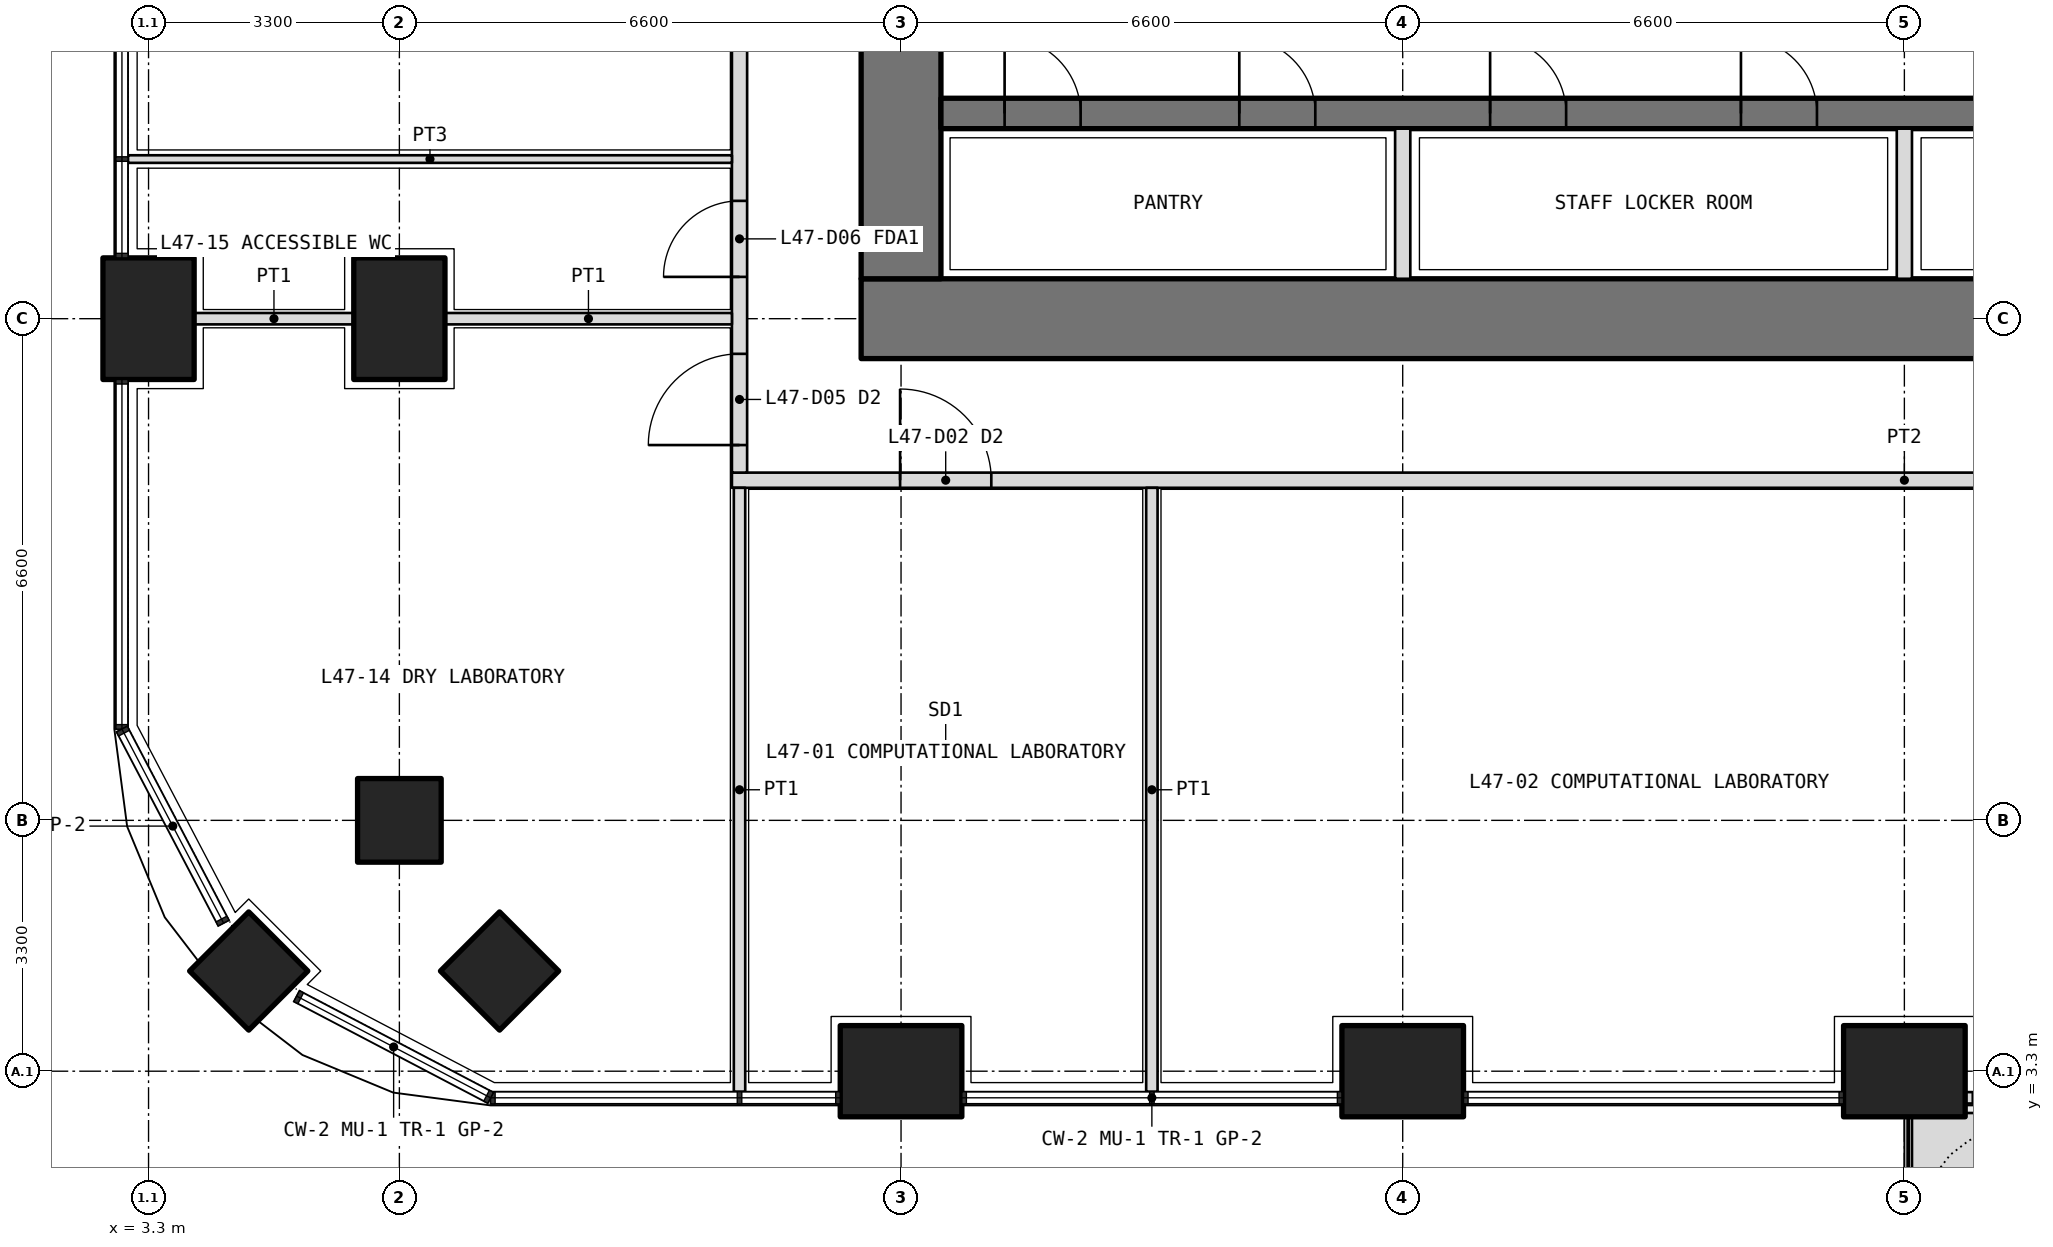
"""IFC4 building model, lengths in metres.
Left out: names, types, materials, properties, quantities, classifications, styles, units other than length and angle.
Written with IfcOpenShell. Run it as: python <this file> out.ifc"""

import sys

from ifc_helpers import new_model, si_unit, direction, frame, frame_2d, origin, origin_2d, place, context, subcontext, project, spatial, polyline, rectangle, outline, extrude, element, fill, save


model = new_model("IFC4")
c1 = context("Model", 3, precision=1e-05, world=origin(), true_north=direction((0.0, 1.0)))
c2 = subcontext(c1, "Body", "Model", "MODEL_VIEW")
j1 = project(units=[si_unit("LENGTHUNIT", "METRE"), si_unit("PLANEANGLEUNIT", "RADIAN")], contexts=[c1])
p1 = place(None, origin())
s1 = spatial("IfcSite", under=j1, at=p1, CompositionType="ELEMENT")
p2 = place(p1, origin())
s2 = spatial("IfcBuilding", under=s1, at=p2, CompositionType="ELEMENT")
p3 = place(p2, frame((0.0, 0.0, 206.1)))
s3 = spatial("IfcBuildingStorey", under=s2, at=p3, CompositionType="ELEMENT", Elevation=206.1)
p4 = place(p3, frame((4.618, 4.618, 0.0), z_axis=(0.0, 0.0, 1.0), x_axis=(0.707106781187, 0.707106781187, 0.0)))
e1 = element("IfcColumn", 1, at=p4, inside=s3, PredefinedType="COLUMN", context=c2, shape_type="SweptSolid", body=[
    extrude(rectangle(XDim=1.1, YDim=1.1, at=origin_2d()), origin(), (0.0, 0.0, 1.0), 4.2),
])
for number, where, z_axis, x_axis in (
    (2, (13.2, 3.3, 0.0), (0.0, 0.0, 1.0), (1.0, 0.0, 0.0)),
    (3, (19.8, 3.3, 0.0), (0.0, 0.0, 1.0), (1.0, 0.0, 0.0)),
    (4, (26.4, 3.3, 0.0), (0.0, 0.0, 1.0), (1.0, 0.0, 0.0)),
    (5, (3.3, 13.2, 0.0), (0.0, 0.0, 1.0), (0.0, 1.0, 0.0)),
):
    element("IfcColumn", number, at=place(p3, frame(where, z_axis=z_axis, x_axis=x_axis)), inside=s3, PredefinedType="COLUMN", context=c2, shape_type="SweptSolid", body=[
        extrude(rectangle(XDim=1.6, YDim=1.2, at=origin_2d()), origin(), (0.0, 0.0, 1.0), 4.2),
    ])
for number, where, z_axis, x_axis in (
    (6, (6.6, 6.6, 0.0), (0.0, 0.0, 1.0), (1.0, 0.0, 0.0)),
    (7, (7.918, 4.618, 0.0), (0.0, 0.0, 1.0), (0.707, 0.707, 0.0)),
):
    element("IfcColumn", number, at=place(p3, frame(where, z_axis=z_axis, x_axis=x_axis)), inside=s3, PredefinedType="COLUMN", context=c2, shape_type="SweptSolid", body=[
        extrude(rectangle(XDim=1.1, YDim=1.1, at=origin_2d()), origin(), (0.0, 0.0, 1.0), 4.2),
    ])
p5 = place(p3, frame((6.6, 13.2, 0.0), z_axis=(0.0, 0.0, 1.0), x_axis=(0.0, 1.0, 0.0)))
e8 = element("IfcColumn", 8, at=p5, inside=s3, PredefinedType="COLUMN", context=c2, shape_type="SweptSolid", body=[
    extrude(rectangle(XDim=1.6, YDim=1.2, at=origin_2d()), origin(), (0.0, 0.0, 1.0), 4.2),
])
p6 = place(p3, origin())
e9 = element("IfcWall", 9, at=p6, inside=s3, PredefinedType="USERDEFINED", context=c2, shape_type="SweptSolid", body=[
    extrude(outline(polyline([(26.5, 1.75), (28.95, 1.75), (28.95, 2.75), (26.5, 2.75), (26.5, 1.75)]), holes=[polyline([(26.65, 1.9), (28.8, 1.9), (28.8, 2.6), (26.65, 2.6), (26.65, 1.9)])]), origin(), (0.0, 0.0, 1.0), 1.05),
])
p7 = place(p3, frame((27.2, 2.95, 0.0), z_axis=(0.0, 0.0, 1.0), x_axis=(1.0, 0.0, 0.0)))
e10 = element("IfcWall", 10, at=p7, inside=s3, PredefinedType="SOLIDWALL", context=c2, shape_type="SweptSolid", body=[
    extrude(rectangle(XDim=5.0, YDim=0.15, at=frame_2d((2.5, 0.0))), origin(), (0.0, 0.0, 1.0), 2.7),
])
p8 = place(p7, frame((2.75, 0.0, 0.0)))
e11 = element("IfcOpeningElement", 11, at=p8, cuts=e10, PredefinedType="OPENING", context=c2, shape_type="SweptSolid", body=[
    extrude(rectangle(XDim=1.0, YDim=2.4, at=frame_2d((0.5, 1.2))), frame((0.0, 0.085, 0.0), z_axis=(0.0, -1.0, 0.0), x_axis=(1.0, 0.0, 0.0)), (0.0, 0.0, 1.0), 0.17),
])
p9 = place(p7, frame((0.1, 0.0, 0.1)))
e12 = element("IfcOpeningElement", 12, at=p9, cuts=e10, PredefinedType="OPENING", context=c2, shape_type="SweptSolid", body=[
    extrude(rectangle(XDim=2.15, YDim=2.3, at=frame_2d((1.075, 1.15))), frame((0.0, 0.085, 0.0), z_axis=(0.0, -1.0, 0.0), x_axis=(1.0, 0.0, 0.0)), (0.0, 0.0, 1.0), 0.17),
])
p10 = place(p7, frame((3.85, 0.0, 0.1)))
e13 = element("IfcOpeningElement", 13, at=p10, cuts=e10, PredefinedType="OPENING", context=c2, shape_type="SweptSolid", body=[
    extrude(rectangle(XDim=1.05, YDim=2.3, at=frame_2d((0.525, 1.15))), frame((0.0, 0.085, 0.0), z_axis=(0.0, -1.0, 0.0), x_axis=(1.0, 0.0, 0.0)), (0.0, 0.0, 1.0), 0.17),
])
p11 = place(p3, frame((12.675, 13.2, 0.0), z_axis=(0.0, 0.0, 1.0), x_axis=(1.0, 0.0, 0.0)))
e14 = element("IfcWall", 14, at=p11, inside=s3, PredefinedType="SHEAR", context=c2, shape_type="SweptSolid", body=[
    extrude(rectangle(XDim=27.45, YDim=1.05, at=frame_2d((13.725, 0.0))), origin(), (0.0, 0.0, 1.0), 4.2),
])
p12 = place(p3, frame((13.2, 32.475, 0.0), z_axis=(0.0, 0.0, 1.0), x_axis=(0.0, -1.0, 0.0)))
e15 = element("IfcWall", 15, at=p12, inside=s3, PredefinedType="SHEAR", context=c2, shape_type="SweptSolid", body=[
    extrude(rectangle(XDim=18.75, YDim=1.05, at=frame_2d((9.375, 0.0))), origin(), (0.0, 0.0, 1.0), 4.2),
])
p13 = place(p12, frame((14.125, 0.0, 0.0)))
e16 = element("IfcOpeningElement", 16, at=p13, cuts=e15, PredefinedType="OPENING", context=c2, shape_type="SweptSolid", body=[
    extrude(rectangle(XDim=1.6, YDim=2.1, at=frame_2d((0.8, 1.05))), frame((0.0, 0.535, 0.0), z_axis=(0.0, -1.0, 0.0), x_axis=(1.0, 0.0, 0.0)), (0.0, 0.0, 1.0), 1.07),
])
p14 = place(p12, frame((3.325, 0.0, 0.0)))
e17 = element("IfcOpeningElement", 17, at=p14, cuts=e15, PredefinedType="OPENING", context=c2, shape_type="SweptSolid", body=[
    extrude(rectangle(XDim=1.6, YDim=2.1, at=frame_2d((0.8, 1.05))), frame((0.0, 0.535, 0.0), z_axis=(0.0, -1.0, 0.0), x_axis=(1.0, 0.0, 0.0)), (0.0, 0.0, 1.0), 1.07),
])
p15 = place(p3, frame((13.725, 15.9, 0.0), z_axis=(0.0, 0.0, 1.0), x_axis=(1.0, 0.0, 0.0)))
e18 = element("IfcWall", 18, at=p15, inside=s3, PredefinedType="SHEAR", context=c2, shape_type="SweptSolid", body=[
    extrude(rectangle(XDim=25.35, YDim=0.4, at=frame_2d((12.675, 0.0))), origin(), (0.0, 0.0, 1.0), 4.2),
])
p16 = place(p15, frame((0.837, 0.0, 0.0)))
e19 = element("IfcOpeningElement", 19, at=p16, cuts=e18, PredefinedType="OPENING", context=c2, shape_type="SweptSolid", body=[
    extrude(rectangle(XDim=1.0, YDim=2.1, at=frame_2d((0.5, 1.05))), frame((0.0, 0.21, 0.0), z_axis=(0.0, -1.0, 0.0), x_axis=(1.0, 0.0, 0.0)), (0.0, 0.0, 1.0), 0.42),
])
p17 = place(p15, frame((3.925, 0.0, 0.0)))
e20 = element("IfcOpeningElement", 20, at=p17, cuts=e18, PredefinedType="OPENING", context=c2, shape_type="SweptSolid", body=[
    extrude(rectangle(XDim=1.0, YDim=2.1, at=frame_2d((0.5, 1.05))), frame((0.0, 0.21, 0.0), z_axis=(0.0, -1.0, 0.0), x_axis=(1.0, 0.0, 0.0)), (0.0, 0.0, 1.0), 0.42),
])
p18 = place(p15, frame((7.225, 0.0, 0.0)))
e21 = element("IfcOpeningElement", 21, at=p18, cuts=e18, PredefinedType="OPENING", context=c2, shape_type="SweptSolid", body=[
    extrude(rectangle(XDim=1.0, YDim=2.1, at=frame_2d((0.5, 1.05))), frame((0.0, 0.21, 0.0), z_axis=(0.0, -1.0, 0.0), x_axis=(1.0, 0.0, 0.0)), (0.0, 0.0, 1.0), 0.42),
])
p19 = place(p15, frame((10.525, 0.0, 0.0)))
e22 = element("IfcOpeningElement", 22, at=p19, cuts=e18, PredefinedType="OPENING", context=c2, shape_type="SweptSolid", body=[
    extrude(rectangle(XDim=1.0, YDim=2.1, at=frame_2d((0.5, 1.05))), frame((0.0, 0.21, 0.0), z_axis=(0.0, -1.0, 0.0), x_axis=(1.0, 0.0, 0.0)), (0.0, 0.0, 1.0), 0.42),
])
p20 = place(p15, frame((13.825, 0.0, 0.0)))
e23 = element("IfcOpeningElement", 23, at=p20, cuts=e18, PredefinedType="OPENING", context=c2, shape_type="SweptSolid", body=[
    extrude(rectangle(XDim=1.0, YDim=2.1, at=frame_2d((0.5, 1.05))), frame((0.0, 0.21, 0.0), z_axis=(0.0, -1.0, 0.0), x_axis=(1.0, 0.0, 0.0)), (0.0, 0.0, 1.0), 0.42),
])
p21 = place(p15, frame((17.125, 0.0, 0.0)))
e24 = element("IfcOpeningElement", 24, at=p21, cuts=e18, PredefinedType="OPENING", context=c2, shape_type="SweptSolid", body=[
    extrude(rectangle(XDim=1.0, YDim=2.1, at=frame_2d((0.5, 1.05))), frame((0.0, 0.21, 0.0), z_axis=(0.0, -1.0, 0.0), x_axis=(1.0, 0.0, 0.0)), (0.0, 0.0, 1.0), 0.42),
])
p22 = place(p15, frame((20.425, 0.0, 0.0)))
e25 = element("IfcOpeningElement", 25, at=p22, cuts=e18, PredefinedType="OPENING", context=c2, shape_type="SweptSolid", body=[
    extrude(rectangle(XDim=1.0, YDim=2.1, at=frame_2d((0.5, 1.05))), frame((0.0, 0.21, 0.0), z_axis=(0.0, -1.0, 0.0), x_axis=(1.0, 0.0, 0.0)), (0.0, 0.0, 1.0), 0.42),
])
p23 = place(p15, frame((23.512, 0.0, 0.0)))
e26 = element("IfcOpeningElement", 26, at=p23, cuts=e18, PredefinedType="OPENING", context=c2, shape_type="SweptSolid", body=[
    extrude(rectangle(XDim=1.0, YDim=2.1, at=frame_2d((0.5, 1.05))), frame((0.0, 0.21, 0.0), z_axis=(0.0, -1.0, 0.0), x_axis=(1.0, 0.0, 0.0)), (0.0, 0.0, 1.0), 0.42),
])
for number, where, z_axis, x_axis in (
    (27, (19.8, 13.725, 0.0), (0.0, 0.0, 1.0), (0.0, 1.0, 0.0)),
    (28, (26.4, 13.725, 0.0), (0.0, 0.0, 1.0), (0.0, 1.0, 0.0)),
):
    element("IfcWall", number, at=place(p3, frame(where, z_axis=z_axis, x_axis=x_axis)), inside=s3, PredefinedType="PARTITIONING", context=c2, shape_type="SweptSolid", body=[
        extrude(rectangle(XDim=1.975, YDim=0.2, at=frame_2d((0.987, 0.0))), origin(), (0.0, 0.0, 1.0), 4.2),
    ])
p24 = place(p3, frame((10.975, 11.075, 0.0), z_axis=(0.0, 0.0, 1.0), x_axis=(1.0, 0.0, 0.0)))
e29 = element("IfcWall", 29, at=p24, inside=s3, PredefinedType="PARTITIONING", context=c2, shape_type="SweptSolid", body=[
    extrude(rectangle(XDim=30.85, YDim=0.2, at=frame_2d((15.425, 0.0))), origin(), (0.0, 0.0, 1.0), 2.85),
])
p25 = place(p24, frame((2.212, 0.0, 0.0)))
e30 = element("IfcOpeningElement", 30, at=p25, cuts=e29, PredefinedType="OPENING", context=c2, shape_type="SweptSolid", body=[
    extrude(rectangle(XDim=1.2, YDim=2.1, at=frame_2d((0.6, 1.05))), frame((0.0, 0.11, 0.0), z_axis=(0.0, -1.0, 0.0), x_axis=(1.0, 0.0, 0.0)), (0.0, 0.0, 1.0), 0.22),
])
p26 = place(p24, frame((16.475, 0.0, 0.0)))
e31 = element("IfcOpeningElement", 31, at=p26, cuts=e29, PredefinedType="OPENING", context=c2, shape_type="SweptSolid", body=[
    extrude(rectangle(XDim=1.2, YDim=2.1, at=frame_2d((0.6, 1.05))), frame((0.0, 0.11, 0.0), z_axis=(0.0, -1.0, 0.0), x_axis=(1.0, 0.0, 0.0)), (0.0, 0.0, 1.0), 0.22),
])
p27 = place(p24, frame((29.087, 0.0, 0.0)))
e32 = element("IfcOpeningElement", 32, at=p27, cuts=e29, PredefinedType="OPENING", context=c2, shape_type="SweptSolid", body=[
    extrude(rectangle(XDim=1.2, YDim=2.1, at=frame_2d((0.6, 1.05))), frame((0.0, 0.11, 0.0), z_axis=(0.0, -1.0, 0.0), x_axis=(1.0, 0.0, 0.0)), (0.0, 0.0, 1.0), 0.22),
])
p28 = place(p3, frame((11.075, 11.175, 0.0), z_axis=(0.0, 0.0, 1.0), x_axis=(0.0, 1.0, 0.0)))
e33 = element("IfcWall", 33, at=p28, inside=s3, PredefinedType="PARTITIONING", context=c2, shape_type="SweptSolid", body=[
    extrude(rectangle(XDim=18.525, YDim=0.2, at=frame_2d((9.262, 0.0))), origin(), (0.0, 0.0, 1.0), 2.85),
])
p29 = place(p28, frame((0.363, 0.0, 0.0)))
e34 = element("IfcOpeningElement", 34, at=p29, cuts=e33, PredefinedType="OPENING", context=c2, shape_type="SweptSolid", body=[
    extrude(rectangle(XDim=1.2, YDim=2.1, at=frame_2d((0.6, 1.05))), frame((0.0, 0.11, 0.0), z_axis=(0.0, -1.0, 0.0), x_axis=(1.0, 0.0, 0.0)), (0.0, 0.0, 1.0), 0.22),
])
p30 = place(p28, frame((2.575, 0.0, 0.0)))
e35 = element("IfcOpeningElement", 35, at=p30, cuts=e33, PredefinedType="OPENING", context=c2, shape_type="SweptSolid", body=[
    extrude(rectangle(XDim=1.0, YDim=2.1, at=frame_2d((0.5, 1.05))), frame((0.0, 0.11, 0.0), z_axis=(0.0, -1.0, 0.0), x_axis=(1.0, 0.0, 0.0)), (0.0, 0.0, 1.0), 0.22),
])
p31 = place(p28, frame((5.625, 0.0, 0.0)))
e36 = element("IfcOpeningElement", 36, at=p31, cuts=e33, PredefinedType="OPENING", context=c2, shape_type="SweptSolid", body=[
    extrude(rectangle(XDim=0.9, YDim=2.1, at=frame_2d((0.45, 1.05))), frame((0.0, 0.11, 0.0), z_axis=(0.0, -1.0, 0.0), x_axis=(1.0, 0.0, 0.0)), (0.0, 0.0, 1.0), 0.22),
])
p32 = place(p28, frame((9.425, 0.0, 0.0)))
e37 = element("IfcOpeningElement", 37, at=p32, cuts=e33, PredefinedType="OPENING", context=c2, shape_type="SweptSolid", body=[
    extrude(rectangle(XDim=0.9, YDim=2.1, at=frame_2d((0.45, 1.05))), frame((0.0, 0.11, 0.0), z_axis=(0.0, -1.0, 0.0), x_axis=(1.0, 0.0, 0.0)), (0.0, 0.0, 1.0), 0.22),
])
p33 = place(p28, frame((12.975, 0.0, 0.0)))
e38 = element("IfcOpeningElement", 38, at=p33, cuts=e33, PredefinedType="OPENING", context=c2, shape_type="SweptSolid", body=[
    extrude(rectangle(XDim=1.0, YDim=2.1, at=frame_2d((0.5, 1.05))), frame((0.0, 0.11, 0.0), z_axis=(0.0, -1.0, 0.0), x_axis=(1.0, 0.0, 0.0)), (0.0, 0.0, 1.0), 0.22),
])
p34 = place(p28, frame((16.275, 0.0, 0.0)))
e39 = element("IfcOpeningElement", 39, at=p34, cuts=e33, PredefinedType="OPENING", context=c2, shape_type="SweptSolid", body=[
    extrude(rectangle(XDim=1.2, YDim=2.1, at=frame_2d((0.6, 1.05))), frame((0.0, 0.11, 0.0), z_axis=(0.0, -1.0, 0.0), x_axis=(1.0, 0.0, 0.0)), (0.0, 0.0, 1.0), 0.22),
])
for number, where, z_axis, x_axis in (
    (40, (11.075, 3.03, 0.0), (0.0, 0.0, 1.0), (0.0, 1.0, 0.0)),
    (41, (16.5, 3.03, 0.0), (0.0, 0.0, 1.0), (0.0, 1.0, 0.0)),
):
    element("IfcWall", number, at=place(p3, frame(where, z_axis=z_axis, x_axis=x_axis)), inside=s3, PredefinedType="PARTITIONING", context=c2, shape_type="SweptSolid", body=[
        extrude(rectangle(XDim=7.945, YDim=0.15, at=frame_2d((3.973, 0.0))), origin(), (0.0, 0.0, 1.0), 2.7),
    ])
p35 = place(p3, frame((3.03, 15.3, 0.0), z_axis=(0.0, 0.0, 1.0), x_axis=(1.0, 0.0, 0.0)))
e42 = element("IfcWall", 42, at=p35, inside=s3, PredefinedType="PARTITIONING", context=c2, shape_type="SweptSolid", body=[
    extrude(rectangle(XDim=7.945, YDim=0.1, at=frame_2d((3.973, 0.0))), origin(), (0.0, 0.0, 1.0), 2.7),
])
p36 = place(p3, frame((3.9, 13.2, 0.0), z_axis=(0.0, 0.0, 1.0), x_axis=(1.0, 0.0, 0.0)))
e43 = element("IfcWall", 43, at=p36, inside=s3, PredefinedType="PARTITIONING", context=c2, shape_type="SweptSolid", body=[
    extrude(rectangle(XDim=2.1, YDim=0.15, at=frame_2d((1.05, 0.0))), origin(), (0.0, 0.0, 1.0), 2.85),
])
p37 = place(p3, frame((7.2, 13.2, 0.0), z_axis=(0.0, 0.0, 1.0), x_axis=(1.0, 0.0, 0.0)))
e44 = element("IfcWall", 44, at=p37, inside=s3, PredefinedType="PARTITIONING", context=c2, shape_type="SweptSolid", body=[
    extrude(rectangle(XDim=3.775, YDim=0.15, at=frame_2d((1.888, 0.0))), origin(), (0.0, 0.0, 1.0), 2.85),
])
p38 = place(p25, origin())
e45 = element("IfcDoor", 45, at=p38, inside=s3, OperationType="DOUBLE_DOOR_SINGLE_SWING", PredefinedType="DOOR", context=c2, shape_type="SweptSolid", body=[
    extrude(rectangle(XDim=1.2, YDim=2.1, at=frame_2d((0.6, 1.05))), frame((0.0, 0.025, 0.0), z_axis=(0.0, -1.0, 0.0), x_axis=(1.0, 0.0, 0.0)), (0.0, 0.0, 1.0), 0.05),
])
fill(e30, e45)
p39 = place(p29, origin())
e46 = element("IfcDoor", 46, at=p39, inside=s3, OperationType="DOUBLE_DOOR_SINGLE_SWING", PredefinedType="DOOR", context=c2, shape_type="SweptSolid", body=[
    extrude(rectangle(XDim=1.2, YDim=2.1, at=frame_2d((0.6, 1.05))), frame((0.0, 0.025, 0.0), z_axis=(0.0, -1.0, 0.0), x_axis=(1.0, 0.0, 0.0)), (0.0, 0.0, 1.0), 0.05),
])
fill(e34, e46)
p40 = place(p30, origin())
e47 = element("IfcDoor", 47, at=p40, inside=s3, OperationType="SINGLE_SWING_LEFT", PredefinedType="DOOR", context=c2, shape_type="SweptSolid", body=[
    extrude(rectangle(XDim=1.0, YDim=2.1, at=frame_2d((0.5, 1.05))), frame((0.0, 0.025, 0.0), z_axis=(0.0, -1.0, 0.0), x_axis=(1.0, 0.0, 0.0)), (0.0, 0.0, 1.0), 0.05),
])
fill(e35, e47)
p41 = place(p16, origin())
e48 = element("IfcDoor", 48, at=p41, inside=s3, OperationType="SINGLE_SWING_LEFT", PredefinedType="DOOR", context=c2, shape_type="SweptSolid", body=[
    extrude(rectangle(XDim=1.0, YDim=2.1, at=frame_2d((0.5, 1.05))), frame((0.0, 0.025, 0.0), z_axis=(0.0, -1.0, 0.0), x_axis=(1.0, 0.0, 0.0)), (0.0, 0.0, 1.0), 0.05),
])
fill(e19, e48)
p42 = place(p17, origin())
e49 = element("IfcDoor", 49, at=p42, inside=s3, OperationType="SINGLE_SWING_LEFT", PredefinedType="DOOR", context=c2, shape_type="SweptSolid", body=[
    extrude(rectangle(XDim=1.0, YDim=2.1, at=frame_2d((0.5, 1.05))), frame((0.0, 0.025, 0.0), z_axis=(0.0, -1.0, 0.0), x_axis=(1.0, 0.0, 0.0)), (0.0, 0.0, 1.0), 0.05),
])
fill(e20, e49)
p43 = place(p18, origin())
e50 = element("IfcDoor", 50, at=p43, inside=s3, OperationType="SINGLE_SWING_LEFT", PredefinedType="DOOR", context=c2, shape_type="SweptSolid", body=[
    extrude(rectangle(XDim=1.0, YDim=2.1, at=frame_2d((0.5, 1.05))), frame((0.0, 0.025, 0.0), z_axis=(0.0, -1.0, 0.0), x_axis=(1.0, 0.0, 0.0)), (0.0, 0.0, 1.0), 0.05),
])
fill(e21, e50)
p44 = place(p19, origin())
e51 = element("IfcDoor", 51, at=p44, inside=s3, OperationType="SINGLE_SWING_LEFT", PredefinedType="DOOR", context=c2, shape_type="SweptSolid", body=[
    extrude(rectangle(XDim=1.0, YDim=2.1, at=frame_2d((0.5, 1.05))), frame((0.0, 0.025, 0.0), z_axis=(0.0, -1.0, 0.0), x_axis=(1.0, 0.0, 0.0)), (0.0, 0.0, 1.0), 0.05),
])
fill(e22, e51)
save(model, sys.argv[1])
